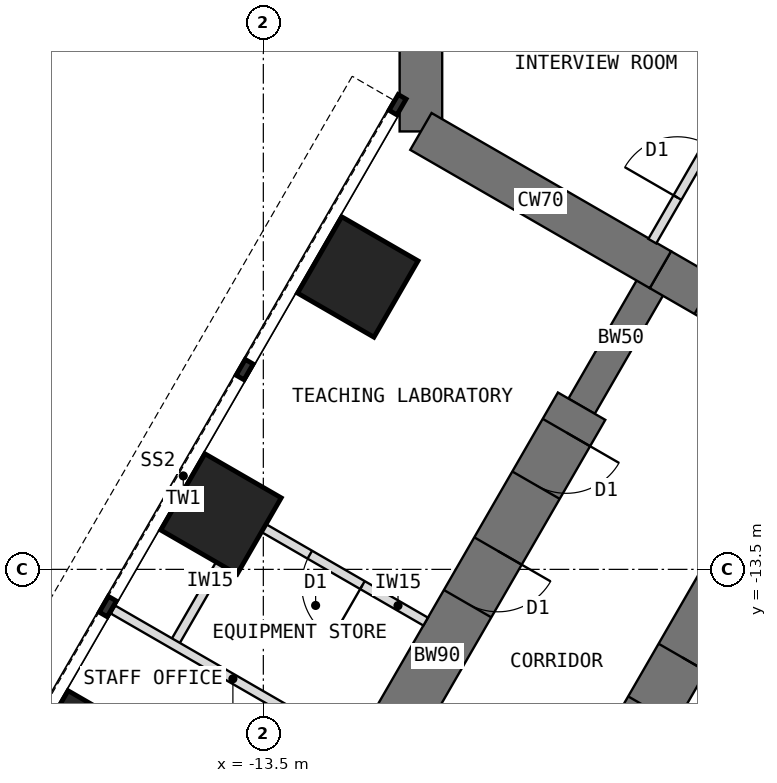
"""IFC4 building model, lengths in metres.
Left out: names, types, materials, properties, quantities, classifications, styles, units other than length and angle.
Written with IfcOpenShell. Run it as: python <this file> out.ifc"""

import sys

from ifc_helpers import new_model, si_unit, direction, frame, frame_2d, origin, origin_2d, place, context, subcontext, project, spatial, rectangle, extrude, element, fill, save


model = new_model("IFC4")
c1 = context("Model", 3, precision=1e-05, world=origin(), true_north=direction((0.0, 1.0)))
c2 = subcontext(c1, "Body", "Model", "MODEL_VIEW")
j1 = project(units=[si_unit("LENGTHUNIT", "METRE"), si_unit("PLANEANGLEUNIT", "RADIAN")], contexts=[c1])
p1 = place(None, origin())
s1 = spatial("IfcSite", under=j1, at=p1, CompositionType="ELEMENT")
p2 = place(p1, origin())
s2 = spatial("IfcBuilding", under=s1, at=p2, CompositionType="ELEMENT")
p3 = place(p2, frame((0.0, 0.0, 68.5)))
s3 = spatial("IfcBuildingStorey", under=s2, at=p3, CompositionType="ELEMENT", Elevation=68.5)
p4 = place(p3, frame((-10.908, 6.298, 0.0), z_axis=(0.0, 0.0, 1.0), x_axis=(0.0, -1.0, 0.0)))
e1 = element("IfcWall", 1, at=p4, inside=s3, PredefinedType="SHEAR", context=c2, shape_type="SweptSolid", body=[
    extrude(rectangle(XDim=12.596, YDim=0.7, at=frame_2d((6.298, 0.0))), origin(), (0.0, 0.0, 1.0), 4.0),
])
p5 = place(p3, frame((-10.908, -6.298, 0.0), z_axis=(0.0, 0.0, 1.0), x_axis=(0.866034513004, -0.499984222037, 0.0)))
e2 = element("IfcWall", 2, at=p5, inside=s3, PredefinedType="SHEAR", context=c2, shape_type="SweptSolid", body=[
    extrude(rectangle(XDim=4.548, YDim=0.7, at=frame_2d((2.274, 0.0))), origin(), (0.0, 0.0, 1.0), 4.0),
])
p6 = place(p3, frame((-6.97, -8.572, 0.0), z_axis=(0.0, 0.0, 1.0), x_axis=(0.866019471182, -0.500010275428, 0.0)))
e3 = element("IfcWall", 3, at=p6, inside=s3, PredefinedType="SHEAR", context=c2, shape_type="SweptSolid", body=[
    extrude(rectangle(XDim=3.5, YDim=0.7, at=frame_2d((1.75, 0.0))), origin(), (0.0, 0.0, 1.0), 4.0),
])
p7 = place(p6, frame((0.85, 0.0, 0.0)))
e4 = element("IfcOpeningElement", 4, at=p7, cuts=e3, PredefinedType="OPENING", context=c2, shape_type="SweptSolid", body=[
    extrude(rectangle(XDim=1.8, YDim=2.1, at=frame_2d((0.9, 1.05))), frame((0.0, 0.36, 0.0), z_axis=(0.0, -1.0, 0.0), x_axis=(1.0, 0.0, 0.0)), (0.0, 0.0, 1.0), 0.72),
])
p8 = place(p3, frame((-5.234, -12.566, 0.0), z_axis=(0.0, 0.0, 1.0), x_axis=(-0.499997557548, -0.86602681393, 0.0)))
e5 = element("IfcWall", 5, at=p8, inside=s3, PredefinedType="SHEAR", context=c2, shape_type="SweptSolid", body=[
    extrude(rectangle(XDim=9.5, YDim=0.9, at=frame_2d((4.75, 0.0))), origin(), (0.0, 0.0, 1.0), 4.0),
])
p9 = place(p8, frame((0.5, 0.0, 0.0)))
e6 = element("IfcOpeningElement", 6, at=p9, cuts=e5, PredefinedType="OPENING", context=c2, shape_type="SweptSolid", body=[
    extrude(rectangle(XDim=1.0, YDim=2.1, at=frame_2d((0.5, 1.05))), frame((0.0, 0.46, 0.0), z_axis=(0.0, -1.0, 0.0), x_axis=(1.0, 0.0, 0.0)), (0.0, 0.0, 1.0), 0.92),
])
p10 = place(p8, frame((2.75, 0.0, 0.0)))
e7 = element("IfcOpeningElement", 7, at=p10, cuts=e5, PredefinedType="OPENING", context=c2, shape_type="SweptSolid", body=[
    extrude(rectangle(XDim=1.0, YDim=2.1, at=frame_2d((0.5, 1.05))), frame((0.0, 0.46, 0.0), z_axis=(0.0, -1.0, 0.0), x_axis=(1.0, 0.0, 0.0)), (0.0, 0.0, 1.0), 0.92),
])
p11 = place(p8, frame((7.25, 0.0, 0.0)))
e8 = element("IfcOpeningElement", 8, at=p11, cuts=e5, PredefinedType="OPENING", context=c2, shape_type="SweptSolid", body=[
    extrude(rectangle(XDim=1.0, YDim=2.1, at=frame_2d((0.5, 1.05))), frame((0.0, 0.46, 0.0), z_axis=(0.0, -1.0, 0.0), x_axis=(1.0, 0.0, 0.0)), (0.0, 0.0, 1.0), 0.92),
])
p12 = place(p3, frame((-6.97, -8.572, 0.0), z_axis=(0.0, 0.0, 1.0), x_axis=(-0.499988811324, -0.866031863473, 0.0)))
e9 = element("IfcWall", 9, at=p12, inside=s3, PredefinedType="SHEAR", context=c2, shape_type="SweptSolid", body=[
    extrude(rectangle(XDim=2.592, YDim=0.5, at=frame_2d((1.296, 0.0))), origin(), (0.0, 0.0, 1.0), 4.0),
])
p13 = place(p3, frame((-8.266, -10.816, 0.0), z_axis=(0.0, 0.0, 1.0), x_axis=(-0.499997557548, -0.86602681393, 0.0)))
e10 = element("IfcWall", 10, at=p13, inside=s3, PredefinedType="SHEAR", context=c2, shape_type="SweptSolid", body=[
    extrude(rectangle(XDim=9.5, YDim=0.9, at=frame_2d((4.75, 0.0))), origin(), (0.0, 0.0, 1.0), 4.0),
])
p14 = place(p13, frame((0.5, 0.0, 0.0)))
e11 = element("IfcOpeningElement", 11, at=p14, cuts=e10, PredefinedType="OPENING", context=c2, shape_type="SweptSolid", body=[
    extrude(rectangle(XDim=1.0, YDim=2.1, at=frame_2d((0.5, 1.05))), frame((0.0, 0.46, 0.0), z_axis=(0.0, -1.0, 0.0), x_axis=(1.0, 0.0, 0.0)), (0.0, 0.0, 1.0), 0.92),
])
p15 = place(p13, frame((2.75, 0.0, 0.0)))
e12 = element("IfcOpeningElement", 12, at=p15, cuts=e10, PredefinedType="OPENING", context=c2, shape_type="SweptSolid", body=[
    extrude(rectangle(XDim=1.0, YDim=2.1, at=frame_2d((0.5, 1.05))), frame((0.0, 0.46, 0.0), z_axis=(0.0, -1.0, 0.0), x_axis=(1.0, 0.0, 0.0)), (0.0, 0.0, 1.0), 0.92),
])
p16 = place(p13, frame((7.25, 0.0, 0.0)))
e13 = element("IfcOpeningElement", 13, at=p16, cuts=e10, PredefinedType="OPENING", context=c2, shape_type="SweptSolid", body=[
    extrude(rectangle(XDim=1.0, YDim=2.1, at=frame_2d((0.5, 1.05))), frame((0.0, 0.46, 0.0), z_axis=(0.0, -1.0, 0.0), x_axis=(1.0, 0.0, 0.0)), (0.0, 0.0, 1.0), 0.92),
])
for number, where, z_axis, x_axis in (
    (14, (-11.946, -8.691, 0.0), (0.0, 0.0, 1.0), (0.5, 0.866, 0.0)),
    (15, (-14.196, -12.588, 0.0), (0.0, 0.0, 1.0), (0.5, 0.866, 0.0)),
    (16, (-16.446, -16.486, 0.0), (0.0, 0.0, 1.0), (0.5, 0.866, 0.0)),
):
    element("IfcColumn", number, at=place(p3, frame(where, z_axis=z_axis, x_axis=x_axis)), inside=s3, PredefinedType="COLUMN", context=c2, shape_type="SweptSolid", body=[
        extrude(rectangle(XDim=1.45, YDim=1.45, at=origin_2d()), origin(), (0.0, 0.0, 1.0), 4.0),
    ])
p17 = place(p3, frame((-12.03, -16.437, 0.0), z_axis=(0.0, 0.0, 1.0), x_axis=(-0.866035472144, 0.499982560684, 0.0)))
e17 = element("IfcWall", 17, at=p17, inside=s3, PredefinedType="PARTITIONING", context=c2, shape_type="SweptSolid", body=[
    extrude(rectangle(XDim=4.55, YDim=0.15, at=frame_2d((2.275, 0.0))), origin(), (0.0, 0.0, 1.0), 3.8),
])
p18 = place(p3, frame((-13.775, -12.658, 0.0), z_axis=(0.0, 0.0, 1.0), x_axis=(-0.500033551112, -0.866006032174, 0.0)))
e18 = element("IfcWall", 18, at=p18, inside=s3, PredefinedType="PARTITIONING", context=c2, shape_type="SweptSolid", body=[
    extrude(rectangle(XDim=2.4, YDim=0.15, at=frame_2d((1.2, 0.0))), origin(), (0.0, 0.0, 1.0), 3.8),
])
p19 = place(p3, frame((-10.83, -14.359, 0.0), z_axis=(0.0, 0.0, 1.0), x_axis=(-0.865989465428, 0.500062241894, 0.0)))
e19 = element("IfcWall", 19, at=p19, inside=s3, PredefinedType="PARTITIONING", context=c2, shape_type="SweptSolid", body=[
    extrude(rectangle(XDim=3.4, YDim=0.15, at=frame_2d((1.7, 0.0))), origin(), (0.0, 0.0, 1.0), 3.8),
])
p20 = place(p19, frame((1.2, 0.0, 0.0)))
e20 = element("IfcOpeningElement", 20, at=p20, cuts=e19, PredefinedType="OPENING", context=c2, shape_type="SweptSolid", body=[
    extrude(rectangle(XDim=1.0, YDim=2.1, at=frame_2d((0.5, 1.05))), frame((0.0, 0.085, 0.0), z_axis=(0.0, -1.0, 0.0), x_axis=(1.0, 0.0, 0.0)), (0.0, 0.0, 1.0), 0.17),
])
p21 = place(p3, frame((-7.103, -8.103, 0.0), z_axis=(0.0, 0.0, 1.0), x_axis=(0.500007369519, 0.866021148949, 0.0)))
e21 = element("IfcWall", 21, at=p21, inside=s3, PredefinedType="PARTITIONING", context=c2, shape_type="SweptSolid", body=[
    extrude(rectangle(XDim=4.426, YDim=0.15, at=frame_2d((2.213, 0.0))), origin(), (0.0, 0.0, 1.0), 3.8),
])
p22 = place(p21, frame((0.828, 0.0, 0.0)))
e22 = element("IfcOpeningElement", 22, at=p22, cuts=e21, PredefinedType="OPENING", context=c2, shape_type="SweptSolid", body=[
    extrude(rectangle(XDim=1.0, YDim=2.1, at=frame_2d((0.5, 1.05))), frame((0.0, 0.085, 0.0), z_axis=(0.0, -1.0, 0.0), x_axis=(1.0, 0.0, 0.0)), (0.0, 0.0, 1.0), 0.17),
])
p23 = place(p7, origin())
e23 = element("IfcDoor", 23, at=p23, inside=s3, OperationType="DOUBLE_DOOR_DOUBLE_SWING", PredefinedType="DOOR", context=c2, shape_type="SweptSolid", body=[
    extrude(rectangle(XDim=1.72, YDim=2.06, at=frame_2d((0.9, 1.03))), frame((0.0, 0.025, 0.0), z_axis=(0.0, -1.0, 0.0), x_axis=(1.0, 0.0, 0.0)), (0.0, 0.0, 1.0), 0.05),
    extrude(rectangle(XDim=0.04, YDim=2.1, at=frame_2d((0.02, 1.05))), frame((0.0, 0.35, 0.0), z_axis=(0.0, -1.0, 0.0), x_axis=(1.0, 0.0, 0.0)), (0.0, 0.0, 1.0), 0.699),
    extrude(rectangle(XDim=0.04, YDim=2.1, at=frame_2d((1.78, 1.05))), frame((0.0, 0.35, 0.0), z_axis=(0.0, -1.0, 0.0), x_axis=(1.0, 0.0, 0.0)), (0.0, 0.0, 1.0), 0.699),
    extrude(rectangle(XDim=1.72, YDim=0.04, at=frame_2d((0.9, 2.08))), frame((0.0, 0.35, 0.0), z_axis=(0.0, -1.0, 0.0), x_axis=(1.0, 0.0, 0.0)), (0.0, 0.0, 1.0), 0.699),
])
fill(e4, e23)
p24 = place(p20, origin())
e24 = element("IfcDoor", 24, at=p24, inside=s3, OperationType="SINGLE_SWING_LEFT", PredefinedType="DOOR", context=c2, shape_type="SweptSolid", body=[
    extrude(rectangle(XDim=1.0, YDim=2.1, at=frame_2d((0.5, 1.05))), frame((0.0, 0.025, 0.0), z_axis=(0.0, -1.0, 0.0), x_axis=(1.0, 0.0, 0.0)), (0.0, 0.0, 1.0), 0.05),
])
fill(e20, e24)
p25 = place(p22, origin())
e25 = element("IfcDoor", 25, at=p25, inside=s3, OperationType="SINGLE_SWING_LEFT", PredefinedType="DOOR", context=c2, shape_type="SweptSolid", body=[
    extrude(rectangle(XDim=1.0, YDim=2.1, at=frame_2d((0.5, 1.05))), frame((0.0, 0.025, 0.0), z_axis=(0.0, -1.0, 0.0), x_axis=(1.0, 0.0, 0.0)), (0.0, 0.0, 1.0), 0.05),
])
fill(e22, e25)
p26 = place(p9, origin())
e26 = element("IfcDoor", 26, at=p26, inside=s3, OperationType="SINGLE_SWING_LEFT", PredefinedType="DOOR", context=c2, shape_type="SweptSolid", body=[
    extrude(rectangle(XDim=0.92, YDim=2.06, at=frame_2d((0.5, 1.03))), frame((0.0, 0.025, 0.0), z_axis=(0.0, -1.0, 0.0), x_axis=(1.0, 0.0, 0.0)), (0.0, 0.0, 1.0), 0.05),
    extrude(rectangle(XDim=0.04, YDim=2.1, at=frame_2d((0.02, 1.05))), frame((0.0, 0.45, 0.0), z_axis=(0.0, -1.0, 0.0), x_axis=(1.0, 0.0, 0.0)), (0.0, 0.0, 1.0), 0.899),
    extrude(rectangle(XDim=0.04, YDim=2.1, at=frame_2d((0.98, 1.05))), frame((0.0, 0.45, 0.0), z_axis=(0.0, -1.0, 0.0), x_axis=(1.0, 0.0, 0.0)), (0.0, 0.0, 1.0), 0.899),
    extrude(rectangle(XDim=0.92, YDim=0.04, at=frame_2d((0.5, 2.08))), frame((0.0, 0.45, 0.0), z_axis=(0.0, -1.0, 0.0), x_axis=(1.0, 0.0, 0.0)), (0.0, 0.0, 1.0), 0.899),
])
fill(e6, e26)
p27 = place(p10, origin())
e27 = element("IfcDoor", 27, at=p27, inside=s3, OperationType="SINGLE_SWING_LEFT", PredefinedType="DOOR", context=c2, shape_type="SweptSolid", body=[
    extrude(rectangle(XDim=0.92, YDim=2.06, at=frame_2d((0.5, 1.03))), frame((0.0, 0.025, 0.0), z_axis=(0.0, -1.0, 0.0), x_axis=(1.0, 0.0, 0.0)), (0.0, 0.0, 1.0), 0.05),
    extrude(rectangle(XDim=0.04, YDim=2.1, at=frame_2d((0.02, 1.05))), frame((0.0, 0.45, 0.0), z_axis=(0.0, -1.0, 0.0), x_axis=(1.0, 0.0, 0.0)), (0.0, 0.0, 1.0), 0.899),
    extrude(rectangle(XDim=0.04, YDim=2.1, at=frame_2d((0.98, 1.05))), frame((0.0, 0.45, 0.0), z_axis=(0.0, -1.0, 0.0), x_axis=(1.0, 0.0, 0.0)), (0.0, 0.0, 1.0), 0.899),
    extrude(rectangle(XDim=0.92, YDim=0.04, at=frame_2d((0.5, 2.08))), frame((0.0, 0.45, 0.0), z_axis=(0.0, -1.0, 0.0), x_axis=(1.0, 0.0, 0.0)), (0.0, 0.0, 1.0), 0.899),
])
fill(e7, e27)
p28 = place(p14, origin())
e28 = element("IfcDoor", 28, at=p28, inside=s3, OperationType="SINGLE_SWING_LEFT", PredefinedType="DOOR", context=c2, shape_type="SweptSolid", body=[
    extrude(rectangle(XDim=0.92, YDim=2.06, at=frame_2d((0.5, 1.03))), frame((0.0, 0.025, 0.0), z_axis=(0.0, -1.0, 0.0), x_axis=(1.0, 0.0, 0.0)), (0.0, 0.0, 1.0), 0.05),
    extrude(rectangle(XDim=0.04, YDim=2.1, at=frame_2d((0.02, 1.05))), frame((0.0, 0.45, 0.0), z_axis=(0.0, -1.0, 0.0), x_axis=(1.0, 0.0, 0.0)), (0.0, 0.0, 1.0), 0.899),
    extrude(rectangle(XDim=0.04, YDim=2.1, at=frame_2d((0.98, 1.05))), frame((0.0, 0.45, 0.0), z_axis=(0.0, -1.0, 0.0), x_axis=(1.0, 0.0, 0.0)), (0.0, 0.0, 1.0), 0.899),
    extrude(rectangle(XDim=0.92, YDim=0.04, at=frame_2d((0.5, 2.08))), frame((0.0, 0.45, 0.0), z_axis=(0.0, -1.0, 0.0), x_axis=(1.0, 0.0, 0.0)), (0.0, 0.0, 1.0), 0.899),
])
fill(e11, e28)
p29 = place(p15, origin())
e29 = element("IfcDoor", 29, at=p29, inside=s3, OperationType="SINGLE_SWING_LEFT", PredefinedType="DOOR", context=c2, shape_type="SweptSolid", body=[
    extrude(rectangle(XDim=0.92, YDim=2.06, at=frame_2d((0.5, 1.03))), frame((0.0, 0.025, 0.0), z_axis=(0.0, -1.0, 0.0), x_axis=(1.0, 0.0, 0.0)), (0.0, 0.0, 1.0), 0.05),
    extrude(rectangle(XDim=0.04, YDim=2.1, at=frame_2d((0.02, 1.05))), frame((0.0, 0.45, 0.0), z_axis=(0.0, -1.0, 0.0), x_axis=(1.0, 0.0, 0.0)), (0.0, 0.0, 1.0), 0.899),
    extrude(rectangle(XDim=0.04, YDim=2.1, at=frame_2d((0.98, 1.05))), frame((0.0, 0.45, 0.0), z_axis=(0.0, -1.0, 0.0), x_axis=(1.0, 0.0, 0.0)), (0.0, 0.0, 1.0), 0.899),
    extrude(rectangle(XDim=0.92, YDim=0.04, at=frame_2d((0.5, 2.08))), frame((0.0, 0.45, 0.0), z_axis=(0.0, -1.0, 0.0), x_axis=(1.0, 0.0, 0.0)), (0.0, 0.0, 1.0), 0.899),
])
fill(e12, e29)
save(model, sys.argv[1])
